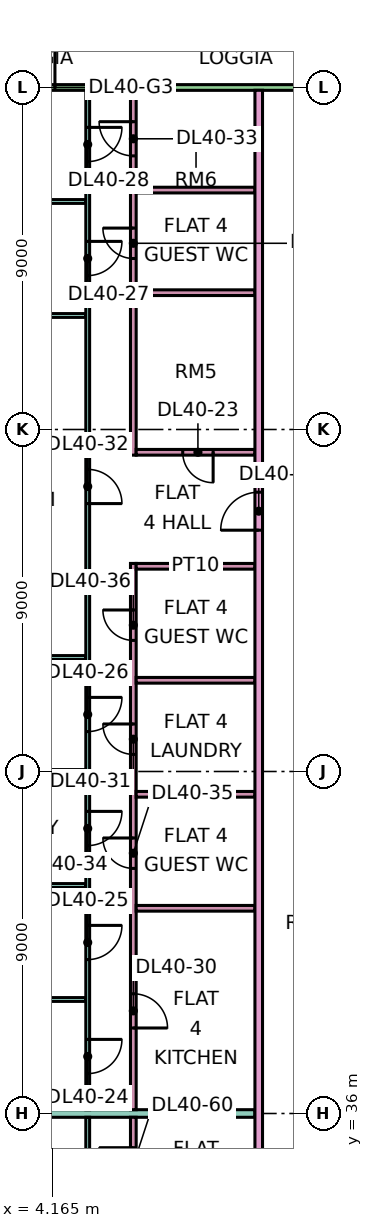
"""IFC4 building model, lengths in metres.
Left out: names, types, materials, properties, quantities, classifications, styles, units other than length and angle.
Written with IfcOpenShell. Run it as: python <this file> out.ifc"""

import sys

from ifc_helpers import new_model, si_unit, direction, frame, frame_2d, origin, place, context, subcontext, project, spatial, rectangle, extrude, element, fill, save


model = new_model("IFC4")
c1 = context("Model", 3, precision=1e-05, world=origin(), true_north=direction((0.0, 1.0)))
c2 = subcontext(c1, "Body", "Model", "MODEL_VIEW")
j1 = project(units=[si_unit("LENGTHUNIT", "METRE"), si_unit("PLANEANGLEUNIT", "RADIAN")], contexts=[c1])
p1 = place(None, origin())
s1 = spatial("IfcSite", under=j1, at=p1, CompositionType="ELEMENT")
p2 = place(p1, origin())
s2 = spatial("IfcBuilding", under=s1, at=p2, CompositionType="ELEMENT")
p3 = place(p2, frame((0.0, 0.0, 176.15)))
s3 = spatial("IfcBuildingStorey", under=s2, at=p3, CompositionType="ELEMENT", Elevation=176.15)
p4 = place(p3, frame((11.925, 63.0, 0.0), z_axis=(0.0, 0.0, 1.0), x_axis=(-1.0, 0.0, 0.0)))
e1 = element("IfcWall", 1, at=p4, inside=s3, PredefinedType="SOLIDWALL", context=c2, shape_type="SweptSolid", body=[
    extrude(rectangle(XDim=10.35, YDim=0.15, at=frame_2d((5.175, 0.0))), origin(), (0.0, 0.0, 1.0), 3.35),
])
p5 = place(p4, frame((7.688, 0.0, 0.0)))
e2 = element("IfcOpeningElement", 2, at=p5, cuts=e1, PredefinedType="OPENING", context=c2, shape_type="SweptSolid", body=[
    extrude(rectangle(XDim=1.8, YDim=2.4, at=frame_2d((0.9, 1.2))), frame((0.0, 0.085, 0.0), z_axis=(0.0, -1.0, 0.0), x_axis=(1.0, 0.0, 0.0)), (0.0, 0.0, 1.0), 0.17),
])
p6 = place(p3, frame((-1.351, 39.0, 0.0), z_axis=(0.0, 0.0, 1.0), x_axis=(1.0, 0.0, 0.0)))
e3 = element("IfcWall", 3, at=p6, inside=s3, PredefinedType="PARTITIONING", context=c2, shape_type="SweptSolid", body=[
    extrude(rectangle(XDim=6.401, YDim=0.1, at=frame_2d((3.201, 0.0))), origin(), (0.0, 0.0, 1.0), 3.35),
])
p7 = place(p3, frame((0.0, 36.0, 0.0), z_axis=(0.0, 0.0, 1.0), x_axis=(1.0, 0.0, 0.0)))
e4 = element("IfcWall", 4, at=p7, inside=s3, PredefinedType="PARTITIONING", context=c2, shape_type="SweptSolid", body=[
    extrude(rectangle(XDim=9.5, YDim=0.2, at=frame_2d((4.75, 0.0))), origin(), (0.0, 0.0, 1.0), 3.35),
])
p8 = place(p3, frame((-1.35, 42.0, 0.0), z_axis=(0.0, 0.0, 1.0), x_axis=(1.0, 0.0, 0.0)))
e5 = element("IfcWall", 5, at=p8, inside=s3, PredefinedType="PARTITIONING", context=c2, shape_type="SweptSolid", body=[
    extrude(rectangle(XDim=6.4, YDim=0.1, at=frame_2d((3.2, 0.0))), origin(), (0.0, 0.0, 1.0), 3.35),
])
p9 = place(p3, frame((0.0, 45.0, 0.0), z_axis=(0.0, 0.0, 1.0), x_axis=(1.0, 0.0, 0.0)))
e6 = element("IfcWall", 6, at=p9, inside=s3, PredefinedType="PARTITIONING", context=c2, shape_type="SweptSolid", body=[
    extrude(rectangle(XDim=5.05, YDim=0.1, at=frame_2d((2.525, 0.0))), origin(), (0.0, 0.0, 1.0), 3.35),
])
p10 = place(p3, frame((0.0, 48.0, 0.0), z_axis=(0.0, 0.0, 1.0), x_axis=(1.0, 0.0, 0.0)))
e7 = element("IfcWall", 7, at=p10, inside=s3, PredefinedType="PARTITIONING", context=c2, shape_type="SweptSolid", body=[
    extrude(rectangle(XDim=5.05, YDim=0.1, at=frame_2d((2.525, 0.0))), origin(), (0.0, 0.0, 1.0), 3.35),
])
for number, where, z_axis, x_axis in (
    (8, (0.074, 57.0, 0.0), (0.0, 0.0, 1.0), (1.0, 0.0, 0.0)),
    (9, (0.074, 60.0, 0.0), (0.0, 0.0, 1.0), (1.0, 0.0, 0.0)),
):
    element("IfcWall", number, at=place(p3, frame(where, z_axis=z_axis, x_axis=x_axis)), inside=s3, PredefinedType="PARTITIONING", context=c2, shape_type="SweptSolid", body=[
        extrude(rectangle(XDim=4.976, YDim=0.1, at=frame_2d((2.488, 0.0))), origin(), (0.0, 0.0, 1.0), 3.35),
    ])
p11 = place(p3, frame((5.1, 29.95, 0.0), z_axis=(0.0, 0.0, 1.0), x_axis=(0.0, 1.0, 0.0)))
e10 = element("IfcWall", 10, at=p11, inside=s3, PredefinedType="PARTITIONING", context=c2, shape_type="SweptSolid", body=[
    extrude(rectangle(XDim=5.95, YDim=0.1, at=frame_2d((2.975, 0.0))), origin(), (0.0, 0.0, 1.0), 3.35),
])
p12 = place(p11, frame((4.1, 0.0, 0.0)))
e11 = element("IfcOpeningElement", 11, at=p12, cuts=e10, PredefinedType="OPENING", context=c2, shape_type="SweptSolid", body=[
    extrude(rectangle(XDim=0.9, YDim=2.1, at=frame_2d((0.45, 1.05))), frame((0.0, 0.06, 0.0), z_axis=(0.0, -1.0, 0.0), x_axis=(1.0, 0.0, 0.0)), (0.0, 0.0, 1.0), 0.12),
])
p13 = place(p11, frame((1.1, 0.0, 0.0)))
e12 = element("IfcOpeningElement", 12, at=p13, cuts=e10, PredefinedType="OPENING", context=c2, shape_type="SweptSolid", body=[
    extrude(rectangle(XDim=0.9, YDim=2.1, at=frame_2d((0.45, 1.05))), frame((0.0, 0.06, 0.0), z_axis=(0.0, -1.0, 0.0), x_axis=(1.0, 0.0, 0.0)), (0.0, 0.0, 1.0), 0.12),
])
p14 = place(p3, frame((5.1, 36.1, 0.0), z_axis=(0.0, 0.0, 1.0), x_axis=(0.0, 1.0, 0.0)))
e13 = element("IfcWall", 13, at=p14, inside=s3, PredefinedType="PARTITIONING", context=c2, shape_type="SweptSolid", body=[
    extrude(rectangle(XDim=26.826, YDim=0.1, at=frame_2d((13.413, 0.0))), origin(), (0.0, 0.0, 1.0), 3.35),
])
p15 = place(p14, frame((0.95, 0.0, 0.0)))
e14 = element("IfcOpeningElement", 14, at=p15, cuts=e13, PredefinedType="OPENING", context=c2, shape_type="SweptSolid", body=[
    extrude(rectangle(XDim=0.9, YDim=2.1, at=frame_2d((0.45, 1.05))), frame((0.0, 0.06, 0.0), z_axis=(0.0, -1.0, 0.0), x_axis=(1.0, 0.0, 0.0)), (0.0, 0.0, 1.0), 0.12),
])
p16 = place(p14, frame((3.95, 0.0, 0.0)))
e15 = element("IfcOpeningElement", 15, at=p16, cuts=e13, PredefinedType="OPENING", context=c2, shape_type="SweptSolid", body=[
    extrude(rectangle(XDim=0.9, YDim=2.1, at=frame_2d((0.45, 1.05))), frame((0.0, 0.06, 0.0), z_axis=(0.0, -1.0, 0.0), x_axis=(1.0, 0.0, 0.0)), (0.0, 0.0, 1.0), 0.12),
])
p17 = place(p14, frame((9.95, 0.0, 0.0)))
e16 = element("IfcOpeningElement", 16, at=p17, cuts=e13, PredefinedType="OPENING", context=c2, shape_type="SweptSolid", body=[
    extrude(rectangle(XDim=0.9, YDim=2.1, at=frame_2d((0.45, 1.05))), frame((0.0, 0.06, 0.0), z_axis=(0.0, -1.0, 0.0), x_axis=(1.0, 0.0, 0.0)), (0.0, 0.0, 1.0), 0.12),
])
p18 = place(p14, frame((21.95, 0.0, 0.0)))
e17 = element("IfcOpeningElement", 17, at=p18, cuts=e13, PredefinedType="OPENING", context=c2, shape_type="SweptSolid", body=[
    extrude(rectangle(XDim=0.9, YDim=2.1, at=frame_2d((0.45, 1.05))), frame((0.0, 0.06, 0.0), z_axis=(0.0, -1.0, 0.0), x_axis=(1.0, 0.0, 0.0)), (0.0, 0.0, 1.0), 0.12),
])
p19 = place(p14, frame((24.95, 0.0, 0.0)))
e18 = element("IfcOpeningElement", 18, at=p19, cuts=e13, PredefinedType="OPENING", context=c2, shape_type="SweptSolid", body=[
    extrude(rectangle(XDim=0.9, YDim=2.1, at=frame_2d((0.45, 1.05))), frame((0.0, 0.06, 0.0), z_axis=(0.0, -1.0, 0.0), x_axis=(1.0, 0.0, 0.0)), (0.0, 0.0, 1.0), 0.12),
])
p20 = place(p14, frame((15.95, 0.0, 0.0)))
e19 = element("IfcOpeningElement", 19, at=p20, cuts=e13, PredefinedType="OPENING", context=c2, shape_type="SweptSolid", body=[
    extrude(rectangle(XDim=0.9, YDim=2.1, at=frame_2d((0.45, 1.05))), frame((0.0, 0.06, 0.0), z_axis=(0.0, -1.0, 0.0), x_axis=(1.0, 0.0, 0.0)), (0.0, 0.0, 1.0), 0.12),
])
p21 = place(p14, frame((6.95, 0.0, 0.0)))
e20 = element("IfcOpeningElement", 20, at=p21, cuts=e13, PredefinedType="OPENING", context=c2, shape_type="SweptSolid", body=[
    extrude(rectangle(XDim=0.9, YDim=2.1, at=frame_2d((0.45, 1.05))), frame((0.0, 0.06, 0.0), z_axis=(0.0, -1.0, 0.0), x_axis=(1.0, 0.0, 0.0)), (0.0, 0.0, 1.0), 0.12),
])
p22 = place(p3, frame((6.3, 26.325, 0.0), z_axis=(0.0, 0.0, 1.0), x_axis=(0.0, 1.0, 0.0)))
e21 = element("IfcWall", 21, at=p22, inside=s3, PredefinedType="PARTITIONING", context=c2, shape_type="SweptSolid", body=[
    extrude(rectangle(XDim=9.575, YDim=0.15, at=frame_2d((4.788, 0.0))), origin(), (0.0, 0.0, 1.0), 3.35),
])
p23 = place(p22, frame((7.875, 0.0, 0.0)))
e22 = element("IfcOpeningElement", 22, at=p23, cuts=e21, PredefinedType="OPENING", context=c2, shape_type="SweptSolid", body=[
    extrude(rectangle(XDim=0.9, YDim=2.1, at=frame_2d((0.45, 1.05))), frame((0.0, 0.085, 0.0), z_axis=(0.0, -1.0, 0.0), x_axis=(1.0, 0.0, 0.0)), (0.0, 0.0, 1.0), 0.17),
])
p24 = place(p22, frame((4.725, 0.0, 0.0)))
e23 = element("IfcOpeningElement", 23, at=p24, cuts=e21, PredefinedType="OPENING", context=c2, shape_type="SweptSolid", body=[
    extrude(rectangle(XDim=0.8, YDim=2.1, at=frame_2d((0.4, 1.05))), frame((0.0, 0.085, 0.0), z_axis=(0.0, -1.0, 0.0), x_axis=(1.0, 0.0, 0.0)), (0.0, 0.0, 1.0), 0.17),
])
p25 = place(p3, frame((6.3, 36.1, 0.0), z_axis=(0.0, 0.0, 1.0), x_axis=(0.0, 1.0, 0.0)))
e24 = element("IfcWall", 24, at=p25, inside=s3, PredefinedType="PARTITIONING", context=c2, shape_type="SweptSolid", body=[
    extrude(rectangle(XDim=14.375, YDim=0.15, at=frame_2d((7.188, 0.0))), origin(), (0.0, 0.0, 1.0), 3.35),
])
p26 = place(p25, frame((2.15, 0.0, 0.0)))
e25 = element("IfcOpeningElement", 25, at=p26, cuts=e24, PredefinedType="OPENING", context=c2, shape_type="SweptSolid", body=[
    extrude(rectangle(XDim=0.9, YDim=2.1, at=frame_2d((0.45, 1.05))), frame((0.0, 0.085, 0.0), z_axis=(0.0, -1.0, 0.0), x_axis=(1.0, 0.0, 0.0)), (0.0, 0.0, 1.0), 0.17),
])
p27 = place(p25, frame((9.35, 0.0, 0.0)))
e26 = element("IfcOpeningElement", 26, at=p27, cuts=e24, PredefinedType="OPENING", context=c2, shape_type="SweptSolid", body=[
    extrude(rectangle(XDim=0.8, YDim=2.1, at=frame_2d((0.4, 1.05))), frame((0.0, 0.085, 0.0), z_axis=(0.0, -1.0, 0.0), x_axis=(1.0, 0.0, 0.0)), (0.0, 0.0, 1.0), 0.17),
])
p28 = place(p25, frame((6.35, 0.0, 0.0)))
e27 = element("IfcOpeningElement", 27, at=p28, cuts=e24, PredefinedType="OPENING", context=c2, shape_type="SweptSolid", body=[
    extrude(rectangle(XDim=0.8, YDim=2.1, at=frame_2d((0.4, 1.05))), frame((0.0, 0.085, 0.0), z_axis=(0.0, -1.0, 0.0), x_axis=(1.0, 0.0, 0.0)), (0.0, 0.0, 1.0), 0.17),
])
p29 = place(p25, frame((12.35, 0.0, 0.0)))
e28 = element("IfcOpeningElement", 28, at=p29, cuts=e24, PredefinedType="OPENING", context=c2, shape_type="SweptSolid", body=[
    extrude(rectangle(XDim=0.8, YDim=2.1, at=frame_2d((0.4, 1.05))), frame((0.0, 0.085, 0.0), z_axis=(0.0, -1.0, 0.0), x_axis=(1.0, 0.0, 0.0)), (0.0, 0.0, 1.0), 0.17),
])
p30 = place(p3, frame((6.3, 53.325, 0.0), z_axis=(0.0, 0.0, 1.0), x_axis=(0.0, 1.0, 0.0)))
e29 = element("IfcWall", 29, at=p30, inside=s3, PredefinedType="PARTITIONING", context=c2, shape_type="SweptSolid", body=[
    extrude(rectangle(XDim=9.601, YDim=0.15, at=frame_2d((4.801, 0.0))), origin(), (0.0, 0.0, 1.0), 3.35),
])
p31 = place(p30, frame((7.875, 0.0, 0.0)))
e30 = element("IfcOpeningElement", 30, at=p31, cuts=e29, PredefinedType="OPENING", context=c2, shape_type="SweptSolid", body=[
    extrude(rectangle(XDim=0.9, YDim=2.1, at=frame_2d((0.45, 1.05))), frame((0.0, 0.085, 0.0), z_axis=(0.0, -1.0, 0.0), x_axis=(1.0, 0.0, 0.0)), (0.0, 0.0, 1.0), 0.17),
])
p32 = place(p30, frame((5.175, 0.0, 0.0)))
e31 = element("IfcOpeningElement", 31, at=p32, cuts=e29, PredefinedType="OPENING", context=c2, shape_type="SweptSolid", body=[
    extrude(rectangle(XDim=0.8, YDim=2.1, at=frame_2d((0.4, 1.05))), frame((0.0, 0.085, 0.0), z_axis=(0.0, -1.0, 0.0), x_axis=(1.0, 0.0, 0.0)), (0.0, 0.0, 1.0), 0.17),
])
for number, where, z_axis, x_axis in (
    (32, (6.375, 41.4, 0.0), (0.0, 0.0, 1.0), (1.0, 0.0, 0.0)),
    (33, (6.375, 44.4, 0.0), (0.0, 0.0, 1.0), (1.0, 0.0, 0.0)),
    (34, (6.375, 47.4, 0.0), (0.0, 0.0, 1.0), (1.0, 0.0, 0.0)),
    (35, (6.375, 50.4, 0.0), (0.0, 0.0, 1.0), (1.0, 0.0, 0.0)),
):
    element("IfcWall", number, at=place(p3, frame(where, z_axis=z_axis, x_axis=x_axis)), inside=s3, PredefinedType="PARTITIONING", context=c2, shape_type="SweptSolid", body=[
        extrude(rectangle(XDim=3.125, YDim=0.15, at=frame_2d((1.562, 0.0))), origin(), (0.0, 0.0, 1.0), 3.35),
    ])
p33 = place(p3, frame((6.375, 53.4, 0.0), z_axis=(0.0, 0.0, 1.0), x_axis=(1.0, 0.0, 0.0)))
e36 = element("IfcWall", 36, at=p33, inside=s3, PredefinedType="PARTITIONING", context=c2, shape_type="SweptSolid", body=[
    extrude(rectangle(XDim=3.125, YDim=0.15, at=frame_2d((1.562, 0.0))), origin(), (0.0, 0.0, 1.0), 3.35),
])
p34 = place(p33, frame((1.225, 0.0, 0.0)))
e37 = element("IfcOpeningElement", 37, at=p34, cuts=e36, PredefinedType="OPENING", context=c2, shape_type="SweptSolid", body=[
    extrude(rectangle(XDim=0.8, YDim=2.1, at=frame_2d((0.4, 1.05))), frame((0.0, 0.085, 0.0), z_axis=(0.0, -1.0, 0.0), x_axis=(1.0, 0.0, 0.0)), (0.0, 0.0, 1.0), 0.17),
])
for number, where, z_axis, x_axis in (
    (38, (6.375, 57.6, 0.0), (0.0, 0.0, 1.0), (1.0, 0.0, 0.0)),
    (39, (6.375, 60.3, 0.0), (0.0, 0.0, 1.0), (1.0, 0.0, 0.0)),
):
    element("IfcWall", number, at=place(p3, frame(where, z_axis=z_axis, x_axis=x_axis)), inside=s3, PredefinedType="PARTITIONING", context=c2, shape_type="SweptSolid", body=[
        extrude(rectangle(XDim=3.125, YDim=0.15, at=frame_2d((1.562, 0.0))), origin(), (0.0, 0.0, 1.0), 3.35),
    ])
p35 = place(p3, frame((9.6, 20.0, 0.0), z_axis=(0.0, 0.0, 1.0), x_axis=(0.0, 1.0, 0.0)))
e40 = element("IfcWall", 40, at=p35, inside=s3, PredefinedType="PARTITIONING", context=c2, shape_type="SweptSolid", body=[
    extrude(rectangle(XDim=42.926, YDim=0.2, at=frame_2d((21.463, 0.0))), origin(), (0.0, 0.0, 1.0), 3.35),
])
p36 = place(p35, frame((31.35, 0.0, 0.0)))
e41 = element("IfcOpeningElement", 41, at=p36, cuts=e40, PredefinedType="OPENING", context=c2, shape_type="SweptSolid", body=[
    extrude(rectangle(XDim=1.0, YDim=2.1, at=frame_2d((0.5, 1.05))), frame((0.0, 0.11, 0.0), z_axis=(0.0, -1.0, 0.0), x_axis=(1.0, 0.0, 0.0)), (0.0, 0.0, 1.0), 0.22),
])
p37 = place(p35, frame((0.6, 0.0, 0.0)))
e42 = element("IfcOpeningElement", 42, at=p37, cuts=e40, PredefinedType="OPENING", context=c2, shape_type="SweptSolid", body=[
    extrude(rectangle(XDim=1.2, YDim=2.1, at=frame_2d((0.6, 1.05))), frame((0.0, 0.11, 0.0), z_axis=(0.0, -1.0, 0.0), x_axis=(1.0, 0.0, 0.0)), (0.0, 0.0, 1.0), 0.22),
])
p38 = place(p35, frame((3.9, 0.0, 0.0)))
e43 = element("IfcOpeningElement", 43, at=p38, cuts=e40, PredefinedType="OPENING", context=c2, shape_type="SweptSolid", body=[
    extrude(rectangle(XDim=1.0, YDim=2.1, at=frame_2d((0.5, 1.05))), frame((0.0, 0.11, 0.0), z_axis=(0.0, -1.0, 0.0), x_axis=(1.0, 0.0, 0.0)), (0.0, 0.0, 1.0), 0.22),
])
p39 = place(p5, frame((1.8, 0.0, 0.0), z_axis=(0.0, 0.0, 1.0), x_axis=(-1.0, 0.0, 0.0)))
e44 = element("IfcDoor", 44, at=p39, inside=s3, OperationType="DOUBLE_DOOR_SINGLE_SWING", PredefinedType="DOOR", context=c2, shape_type="SweptSolid", body=[
    extrude(rectangle(XDim=1.8, YDim=2.4, at=frame_2d((0.9, 1.2))), frame((0.0, 0.025, 0.0), z_axis=(0.0, -1.0, 0.0), x_axis=(1.0, 0.0, 0.0)), (0.0, 0.0, 1.0), 0.05),
])
fill(e2, e44)
p40 = place(p34, origin())
e45 = element("IfcDoor", 45, at=p40, inside=s3, OperationType="SINGLE_SWING_RIGHT", PredefinedType="DOOR", context=c2, shape_type="SweptSolid", body=[
    extrude(rectangle(XDim=0.8, YDim=2.1, at=frame_2d((0.4, 1.05))), frame((0.0, 0.025, 0.0), z_axis=(0.0, -1.0, 0.0), x_axis=(1.0, 0.0, 0.0)), (0.0, 0.0, 1.0), 0.05),
])
fill(e37, e45)
p41 = place(p15, origin())
e46 = element("IfcDoor", 46, at=p41, inside=s3, OperationType="SINGLE_SWING_RIGHT", PredefinedType="DOOR", context=c2, shape_type="SweptSolid", body=[
    extrude(rectangle(XDim=0.9, YDim=2.1, at=frame_2d((0.45, 1.05))), frame((0.0, 0.025, 0.0), z_axis=(0.0, -1.0, 0.0), x_axis=(1.0, 0.0, 0.0)), (0.0, 0.0, 1.0), 0.05),
])
fill(e14, e46)
p42 = place(p16, origin())
e47 = element("IfcDoor", 47, at=p42, inside=s3, OperationType="SINGLE_SWING_RIGHT", PredefinedType="DOOR", context=c2, shape_type="SweptSolid", body=[
    extrude(rectangle(XDim=0.9, YDim=2.1, at=frame_2d((0.45, 1.05))), frame((0.0, 0.025, 0.0), z_axis=(0.0, -1.0, 0.0), x_axis=(1.0, 0.0, 0.0)), (0.0, 0.0, 1.0), 0.05),
])
fill(e15, e47)
p43 = place(p17, origin())
e48 = element("IfcDoor", 48, at=p43, inside=s3, OperationType="SINGLE_SWING_RIGHT", PredefinedType="DOOR", context=c2, shape_type="SweptSolid", body=[
    extrude(rectangle(XDim=0.9, YDim=2.1, at=frame_2d((0.45, 1.05))), frame((0.0, 0.025, 0.0), z_axis=(0.0, -1.0, 0.0), x_axis=(1.0, 0.0, 0.0)), (0.0, 0.0, 1.0), 0.05),
])
fill(e16, e48)
p44 = place(p18, origin())
e49 = element("IfcDoor", 49, at=p44, inside=s3, OperationType="SINGLE_SWING_RIGHT", PredefinedType="DOOR", context=c2, shape_type="SweptSolid", body=[
    extrude(rectangle(XDim=0.9, YDim=2.1, at=frame_2d((0.45, 1.05))), frame((0.0, 0.025, 0.0), z_axis=(0.0, -1.0, 0.0), x_axis=(1.0, 0.0, 0.0)), (0.0, 0.0, 1.0), 0.05),
])
fill(e17, e49)
p45 = place(p19, origin())
e50 = element("IfcDoor", 50, at=p45, inside=s3, OperationType="SINGLE_SWING_RIGHT", PredefinedType="DOOR", context=c2, shape_type="SweptSolid", body=[
    extrude(rectangle(XDim=0.9, YDim=2.1, at=frame_2d((0.45, 1.05))), frame((0.0, 0.025, 0.0), z_axis=(0.0, -1.0, 0.0), x_axis=(1.0, 0.0, 0.0)), (0.0, 0.0, 1.0), 0.05),
])
fill(e18, e50)
p46 = place(p36, origin())
e51 = element("IfcDoor", 51, at=p46, inside=s3, OperationType="SINGLE_SWING_LEFT", PredefinedType="DOOR", context=c2, shape_type="SweptSolid", body=[
    extrude(rectangle(XDim=1.0, YDim=2.1, at=frame_2d((0.5, 1.05))), frame((0.0, 0.025, 0.0), z_axis=(0.0, -1.0, 0.0), x_axis=(1.0, 0.0, 0.0)), (0.0, 0.0, 1.0), 0.05),
])
fill(e41, e51)
p47 = place(p26, frame((0.9, 0.0, 0.0), z_axis=(0.0, 0.0, 1.0), x_axis=(-1.0, 0.0, 0.0)))
e52 = element("IfcDoor", 52, at=p47, inside=s3, OperationType="SINGLE_SWING_LEFT", PredefinedType="DOOR", context=c2, shape_type="SweptSolid", body=[
    extrude(rectangle(XDim=0.9, YDim=2.1, at=frame_2d((0.45, 1.05))), frame((0.0, 0.025, 0.0), z_axis=(0.0, -1.0, 0.0), x_axis=(1.0, 0.0, 0.0)), (0.0, 0.0, 1.0), 0.05),
])
fill(e25, e52)
p48 = place(p27, frame((0.8, 0.0, 0.0), z_axis=(0.0, 0.0, 1.0), x_axis=(-1.0, 0.0, 0.0)))
e53 = element("IfcDoor", 53, at=p48, inside=s3, OperationType="SINGLE_SWING_RIGHT", PredefinedType="DOOR", context=c2, shape_type="SweptSolid", body=[
    extrude(rectangle(XDim=0.8, YDim=2.1, at=frame_2d((0.4, 1.05))), frame((0.0, 0.025, 0.0), z_axis=(0.0, -1.0, 0.0), x_axis=(1.0, 0.0, 0.0)), (0.0, 0.0, 1.0), 0.05),
])
fill(e26, e53)
p49 = place(p20, frame((0.9, 0.0, 0.0), z_axis=(0.0, 0.0, 1.0), x_axis=(-1.0, 0.0, 0.0)))
e54 = element("IfcDoor", 54, at=p49, inside=s3, OperationType="SINGLE_SWING_LEFT", PredefinedType="DOOR", context=c2, shape_type="SweptSolid", body=[
    extrude(rectangle(XDim=0.9, YDim=2.1, at=frame_2d((0.45, 1.05))), frame((0.0, 0.025, 0.0), z_axis=(0.0, -1.0, 0.0), x_axis=(1.0, 0.0, 0.0)), (0.0, 0.0, 1.0), 0.05),
])
fill(e19, e54)
p50 = place(p31, frame((0.9, 0.0, 0.0), z_axis=(0.0, 0.0, 1.0), x_axis=(-1.0, 0.0, 0.0)))
e55 = element("IfcDoor", 55, at=p50, inside=s3, OperationType="SINGLE_SWING_RIGHT", PredefinedType="DOOR", context=c2, shape_type="SweptSolid", body=[
    extrude(rectangle(XDim=0.9, YDim=2.1, at=frame_2d((0.45, 1.05))), frame((0.0, 0.025, 0.0), z_axis=(0.0, -1.0, 0.0), x_axis=(1.0, 0.0, 0.0)), (0.0, 0.0, 1.0), 0.05),
])
fill(e30, e55)
p51 = place(p21, origin())
e56 = element("IfcDoor", 56, at=p51, inside=s3, OperationType="SINGLE_SWING_RIGHT", PredefinedType="DOOR", context=c2, shape_type="SweptSolid", body=[
    extrude(rectangle(XDim=0.9, YDim=2.1, at=frame_2d((0.45, 1.05))), frame((0.0, 0.025, 0.0), z_axis=(0.0, -1.0, 0.0), x_axis=(1.0, 0.0, 0.0)), (0.0, 0.0, 1.0), 0.05),
])
fill(e20, e56)
p52 = place(p28, frame((0.8, 0.0, 0.0), z_axis=(0.0, 0.0, 1.0), x_axis=(-1.0, 0.0, 0.0)))
e57 = element("IfcDoor", 57, at=p52, inside=s3, OperationType="SINGLE_SWING_RIGHT", PredefinedType="DOOR", context=c2, shape_type="SweptSolid", body=[
    extrude(rectangle(XDim=0.8, YDim=2.1, at=frame_2d((0.4, 1.05))), frame((0.0, 0.025, 0.0), z_axis=(0.0, -1.0, 0.0), x_axis=(1.0, 0.0, 0.0)), (0.0, 0.0, 1.0), 0.05),
])
fill(e27, e57)
p53 = place(p29, frame((0.8, 0.0, 0.0), z_axis=(0.0, 0.0, 1.0), x_axis=(-1.0, 0.0, 0.0)))
e58 = element("IfcDoor", 58, at=p53, inside=s3, OperationType="SINGLE_SWING_RIGHT", PredefinedType="DOOR", context=c2, shape_type="SweptSolid", body=[
    extrude(rectangle(XDim=0.8, YDim=2.1, at=frame_2d((0.4, 1.05))), frame((0.0, 0.025, 0.0), z_axis=(0.0, -1.0, 0.0), x_axis=(1.0, 0.0, 0.0)), (0.0, 0.0, 1.0), 0.05),
])
fill(e28, e58)
p54 = place(p32, frame((0.8, 0.0, 0.0), z_axis=(0.0, 0.0, 1.0), x_axis=(-1.0, 0.0, 0.0)))
e59 = element("IfcDoor", 59, at=p54, inside=s3, OperationType="SINGLE_SWING_RIGHT", PredefinedType="DOOR", context=c2, shape_type="SweptSolid", body=[
    extrude(rectangle(XDim=0.8, YDim=2.1, at=frame_2d((0.4, 1.05))), frame((0.0, 0.025, 0.0), z_axis=(0.0, -1.0, 0.0), x_axis=(1.0, 0.0, 0.0)), (0.0, 0.0, 1.0), 0.05),
])
fill(e31, e59)
p55 = place(p23, frame((0.9, 0.0, 0.0), z_axis=(0.0, 0.0, 1.0), x_axis=(-1.0, 0.0, 0.0)))
e60 = element("IfcDoor", 60, at=p55, inside=s3, OperationType="SINGLE_SWING_RIGHT", PredefinedType="DOOR", context=c2, shape_type="SweptSolid", body=[
    extrude(rectangle(XDim=0.9, YDim=2.1, at=frame_2d((0.45, 1.05))), frame((0.0, 0.025, 0.0), z_axis=(0.0, -1.0, 0.0), x_axis=(1.0, 0.0, 0.0)), (0.0, 0.0, 1.0), 0.05),
])
fill(e22, e60)
save(model, sys.argv[1])
